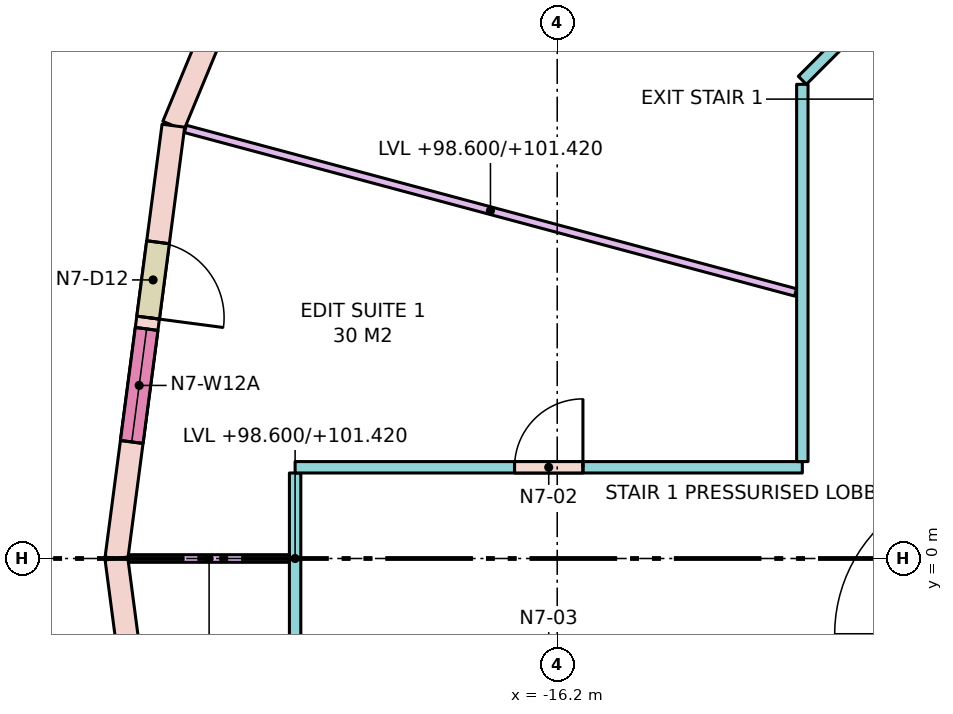
"""IFC4 building model, lengths in metres.
Left out: names, types, materials, properties, quantities, classifications, styles, units other than length and angle.
Written with IfcOpenShell. Run it as: python <this file> out.ifc"""

import sys

from ifc_helpers import new_model, si_unit, direction, frame, frame_2d, origin, place, context, subcontext, project, spatial, rectangle, extrude, element, fill, save


model = new_model("IFC4")
c1 = context("Model", 3, precision=1e-05, world=origin(), true_north=direction((0.0, 1.0)))
c2 = subcontext(c1, "Body", "Model", "MODEL_VIEW")
j1 = project(units=[si_unit("LENGTHUNIT", "METRE"), si_unit("PLANEANGLEUNIT", "RADIAN")], contexts=[c1])
p1 = place(None, origin())
s1 = spatial("IfcSite", under=j1, at=p1, CompositionType="ELEMENT")
p2 = place(p1, origin())
s2 = spatial("IfcBuilding", under=s1, at=p2, CompositionType="ELEMENT")
p3 = place(p2, frame((0.0, 0.0, 98.6)))
s3 = spatial("IfcBuildingStorey", under=s2, at=p3, CompositionType="ELEMENT", Elevation=98.6)
p4 = place(p3, frame((-19.052, 11.0, 0.0), z_axis=(0.0, 0.0, 1.0), x_axis=(-0.382715966503, -0.923866055759, 0.0)))
e1 = element("IfcWall", 1, at=p4, inside=s3, PredefinedType="STANDARD", context=c2, shape_type="SweptSolid", body=[
    extrude(rectangle(XDim=5.743, YDim=0.3, at=frame_2d((2.872, 0.0))), origin(), (0.0, 0.0, 1.0), 3.72),
])
p5 = place(p4, frame((1.572, 0.0, 0.8)))
e2 = element("IfcOpeningElement", 2, at=p5, cuts=e1, PredefinedType="OPENING", context=c2, shape_type="SweptSolid", body=[
    extrude(rectangle(XDim=2.6, YDim=2.7, at=frame_2d((1.3, 1.35))), frame((0.0, 0.16, 0.0), z_axis=(0.0, -1.0, 0.0), x_axis=(1.0, 0.0, 0.0)), (0.0, 0.0, 1.0), 0.32),
])
p6 = place(p3, frame((-21.25, 5.694, 0.0), z_axis=(0.0, 0.0, 1.0), x_axis=(-0.130503995834, -0.991447783331, 0.0)))
e3 = element("IfcWall", 3, at=p6, inside=s3, PredefinedType="STANDARD", context=c2, shape_type="SweptSolid", body=[
    extrude(rectangle(XDim=5.743, YDim=0.3, at=frame_2d((2.872, 0.0))), origin(), (0.0, 0.0, 1.0), 3.72),
])
p7 = place(p6, frame((1.547, 0.0, 0.0)))
e4 = element("IfcOpeningElement", 4, at=p7, cuts=e3, PredefinedType="OPENING", context=c2, shape_type="SweptSolid", body=[
    extrude(rectangle(XDim=1.0, YDim=2.4, at=frame_2d((0.5, 1.2))), frame((0.0, 0.16, 0.0), z_axis=(0.0, -1.0, 0.0), x_axis=(1.0, 0.0, 0.0)), (0.0, 0.0, 1.0), 0.32),
])
p8 = place(p6, frame((2.697, 0.0, 0.8)))
e5 = element("IfcOpeningElement", 5, at=p8, cuts=e3, PredefinedType="OPENING", context=c2, shape_type="SweptSolid", body=[
    extrude(rectangle(XDim=1.5, YDim=2.7, at=frame_2d((0.75, 1.35))), frame((0.0, 0.16, 0.0), z_axis=(0.0, -1.0, 0.0), x_axis=(1.0, 0.0, 0.0)), (0.0, 0.0, 1.0), 0.32),
])
p9 = place(p3, frame((-22.0, 0.0, 0.0), z_axis=(0.0, 0.0, 1.0), x_axis=(0.130503995834, -0.991447783331, 0.0)))
e6 = element("IfcWall", 6, at=p9, inside=s3, PredefinedType="STANDARD", context=c2, shape_type="SweptSolid", body=[
    extrude(rectangle(XDim=5.743, YDim=0.3, at=frame_2d((2.872, 0.0))), origin(), (0.0, 0.0, 1.0), 3.72),
])
p10 = place(p9, frame((1.572, 0.0, 0.8)))
e7 = element("IfcOpeningElement", 7, at=p10, cuts=e6, PredefinedType="OPENING", context=c2, shape_type="SweptSolid", body=[
    extrude(rectangle(XDim=2.6, YDim=2.7, at=frame_2d((1.3, 1.35))), frame((0.0, 0.16, 0.0), z_axis=(0.0, -1.0, 0.0), x_axis=(1.0, 0.0, 0.0)), (0.0, 0.0, 1.0), 0.32),
])
p11 = place(p3, frame((-19.649, -1.125, 0.0), z_axis=(0.0, 0.0, 1.0), x_axis=(0.0, 1.0, 0.0)))
e8 = element("IfcWall", 8, at=p11, inside=s3, PredefinedType="PARTITIONING", context=c2, shape_type="SweptSolid", body=[
    extrude(rectangle(XDim=2.25, YDim=0.15, at=frame_2d((1.125, 0.0))), origin(), (0.0, 0.0, 1.0), 2.82),
])
p12 = place(p3, frame((-19.649, 1.2, 0.0), z_axis=(0.0, 0.0, 1.0), x_axis=(1.0, 0.0, 0.0)))
e9 = element("IfcWall", 9, at=p12, inside=s3, PredefinedType="PARTITIONING", context=c2, shape_type="SweptSolid", body=[
    extrude(rectangle(XDim=6.674, YDim=0.15, at=frame_2d((3.337, 0.0))), origin(), (0.0, 0.0, 1.0), 3.72),
])
p13 = place(p12, frame((2.887, 0.0, 0.0)))
e10 = element("IfcOpeningElement", 10, at=p13, cuts=e9, PredefinedType="OPENING", context=c2, shape_type="SweptSolid", body=[
    extrude(rectangle(XDim=0.9, YDim=2.1, at=frame_2d((0.45, 1.05))), frame((0.0, 0.085, 0.0), z_axis=(0.0, -1.0, 0.0), x_axis=(1.0, 0.0, 0.0)), (0.0, 0.0, 1.0), 0.17),
])
p14 = place(p3, frame((-12.975, 1.275, 0.0), z_axis=(0.0, 0.0, 1.0), x_axis=(0.0, 1.0, 0.0)))
e11 = element("IfcWall", 11, at=p14, inside=s3, PredefinedType="PARTITIONING", context=c2, shape_type="SweptSolid", body=[
    extrude(rectangle(XDim=4.963, YDim=0.15, at=frame_2d((2.482, 0.0))), origin(), (0.0, 0.0, 1.0), 2.82),
])
p15 = place(p3, frame((-12.975, 6.291, 0.0), z_axis=(0.0, 0.0, 1.0), x_axis=(0.707106781187, 0.707106781187, 0.0)))
e12 = element("IfcWall", 12, at=p15, inside=s3, PredefinedType="PARTITIONING", context=c2, shape_type="SweptSolid", body=[
    extrude(rectangle(XDim=6.624, YDim=0.15, at=frame_2d((3.312, 0.0))), origin(), (0.0, 0.0, 1.0), 2.82),
])
p16 = place(p15, frame((2.412, 0.0, 0.0)))
e13 = element("IfcOpeningElement", 13, at=p16, cuts=e12, PredefinedType="OPENING", context=c2, shape_type="SweptSolid", body=[
    extrude(rectangle(XDim=1.8, YDim=2.1, at=frame_2d((0.9, 1.05))), frame((0.0, 0.085, 0.0), z_axis=(0.0, -1.0, 0.0), x_axis=(1.0, 0.0, 0.0)), (0.0, 0.0, 1.0), 0.17),
])
p17 = place(p3, frame((-13.064, 3.5, 0.0), z_axis=(0.0, 0.0, 1.0), x_axis=(-0.965920254223, 0.258839839442, 0.0)))
e14 = element("IfcWall", 14, at=p17, inside=s3, PredefinedType="PARTITIONING", context=c2, shape_type="SweptSolid", body=[
    extrude(rectangle(XDim=8.312, YDim=0.1, at=frame_2d((4.156, 0.0))), origin(), (0.0, 0.0, 1.0), 2.82),
])
p18 = place(p3, frame((-19.724, 0.0, 0.0), z_axis=(0.0, 0.0, 1.0), x_axis=(-1.0, 0.0, 0.0)))
e15 = element("IfcWall", 15, at=p18, inside=s3, PredefinedType="PARTITIONING", context=c2, shape_type="SweptSolid", body=[
    extrude(rectangle(XDim=2.113, YDim=0.1, at=frame_2d((1.057, 0.0))), origin(), (0.0, 0.0, 1.0), 2.82),
])
p19 = place(p7, origin())
e16 = element("IfcDoor", 16, at=p19, inside=s3, OperationType="SINGLE_SWING_RIGHT", PredefinedType="DOOR", context=c2, shape_type="SweptSolid", body=[
    extrude(rectangle(XDim=1.0, YDim=2.4, at=frame_2d((0.5, 1.2))), frame((0.0, 0.025, 0.0), z_axis=(0.0, -1.0, 0.0), x_axis=(1.0, 0.0, 0.0)), (0.0, 0.0, 1.0), 0.05),
])
fill(e4, e16)
p20 = place(p8, origin())
e17 = element("IfcWindow", 17, at=p20, inside=s3, PartitioningType="SINGLE_PANEL", PredefinedType="WINDOW", context=c2, shape_type="SweptSolid", body=[
    extrude(rectangle(XDim=1.5, YDim=2.7, at=frame_2d((0.75, 1.35))), frame((0.0, 0.03, 0.0), z_axis=(0.0, -1.0, 0.0), x_axis=(1.0, 0.0, 0.0)), (0.0, 0.0, 1.0), 0.06),
])
fill(e5, e17)
p21 = place(p13, origin())
e18 = element("IfcDoor", 18, at=p21, inside=s3, OperationType="SINGLE_SWING_RIGHT", PredefinedType="DOOR", context=c2, shape_type="SweptSolid", body=[
    extrude(rectangle(XDim=0.9, YDim=2.1, at=frame_2d((0.45, 1.05))), frame((0.0, 0.025, 0.0), z_axis=(0.0, -1.0, 0.0), x_axis=(1.0, 0.0, 0.0)), (0.0, 0.0, 1.0), 0.05),
])
fill(e10, e18)
save(model, sys.argv[1])
